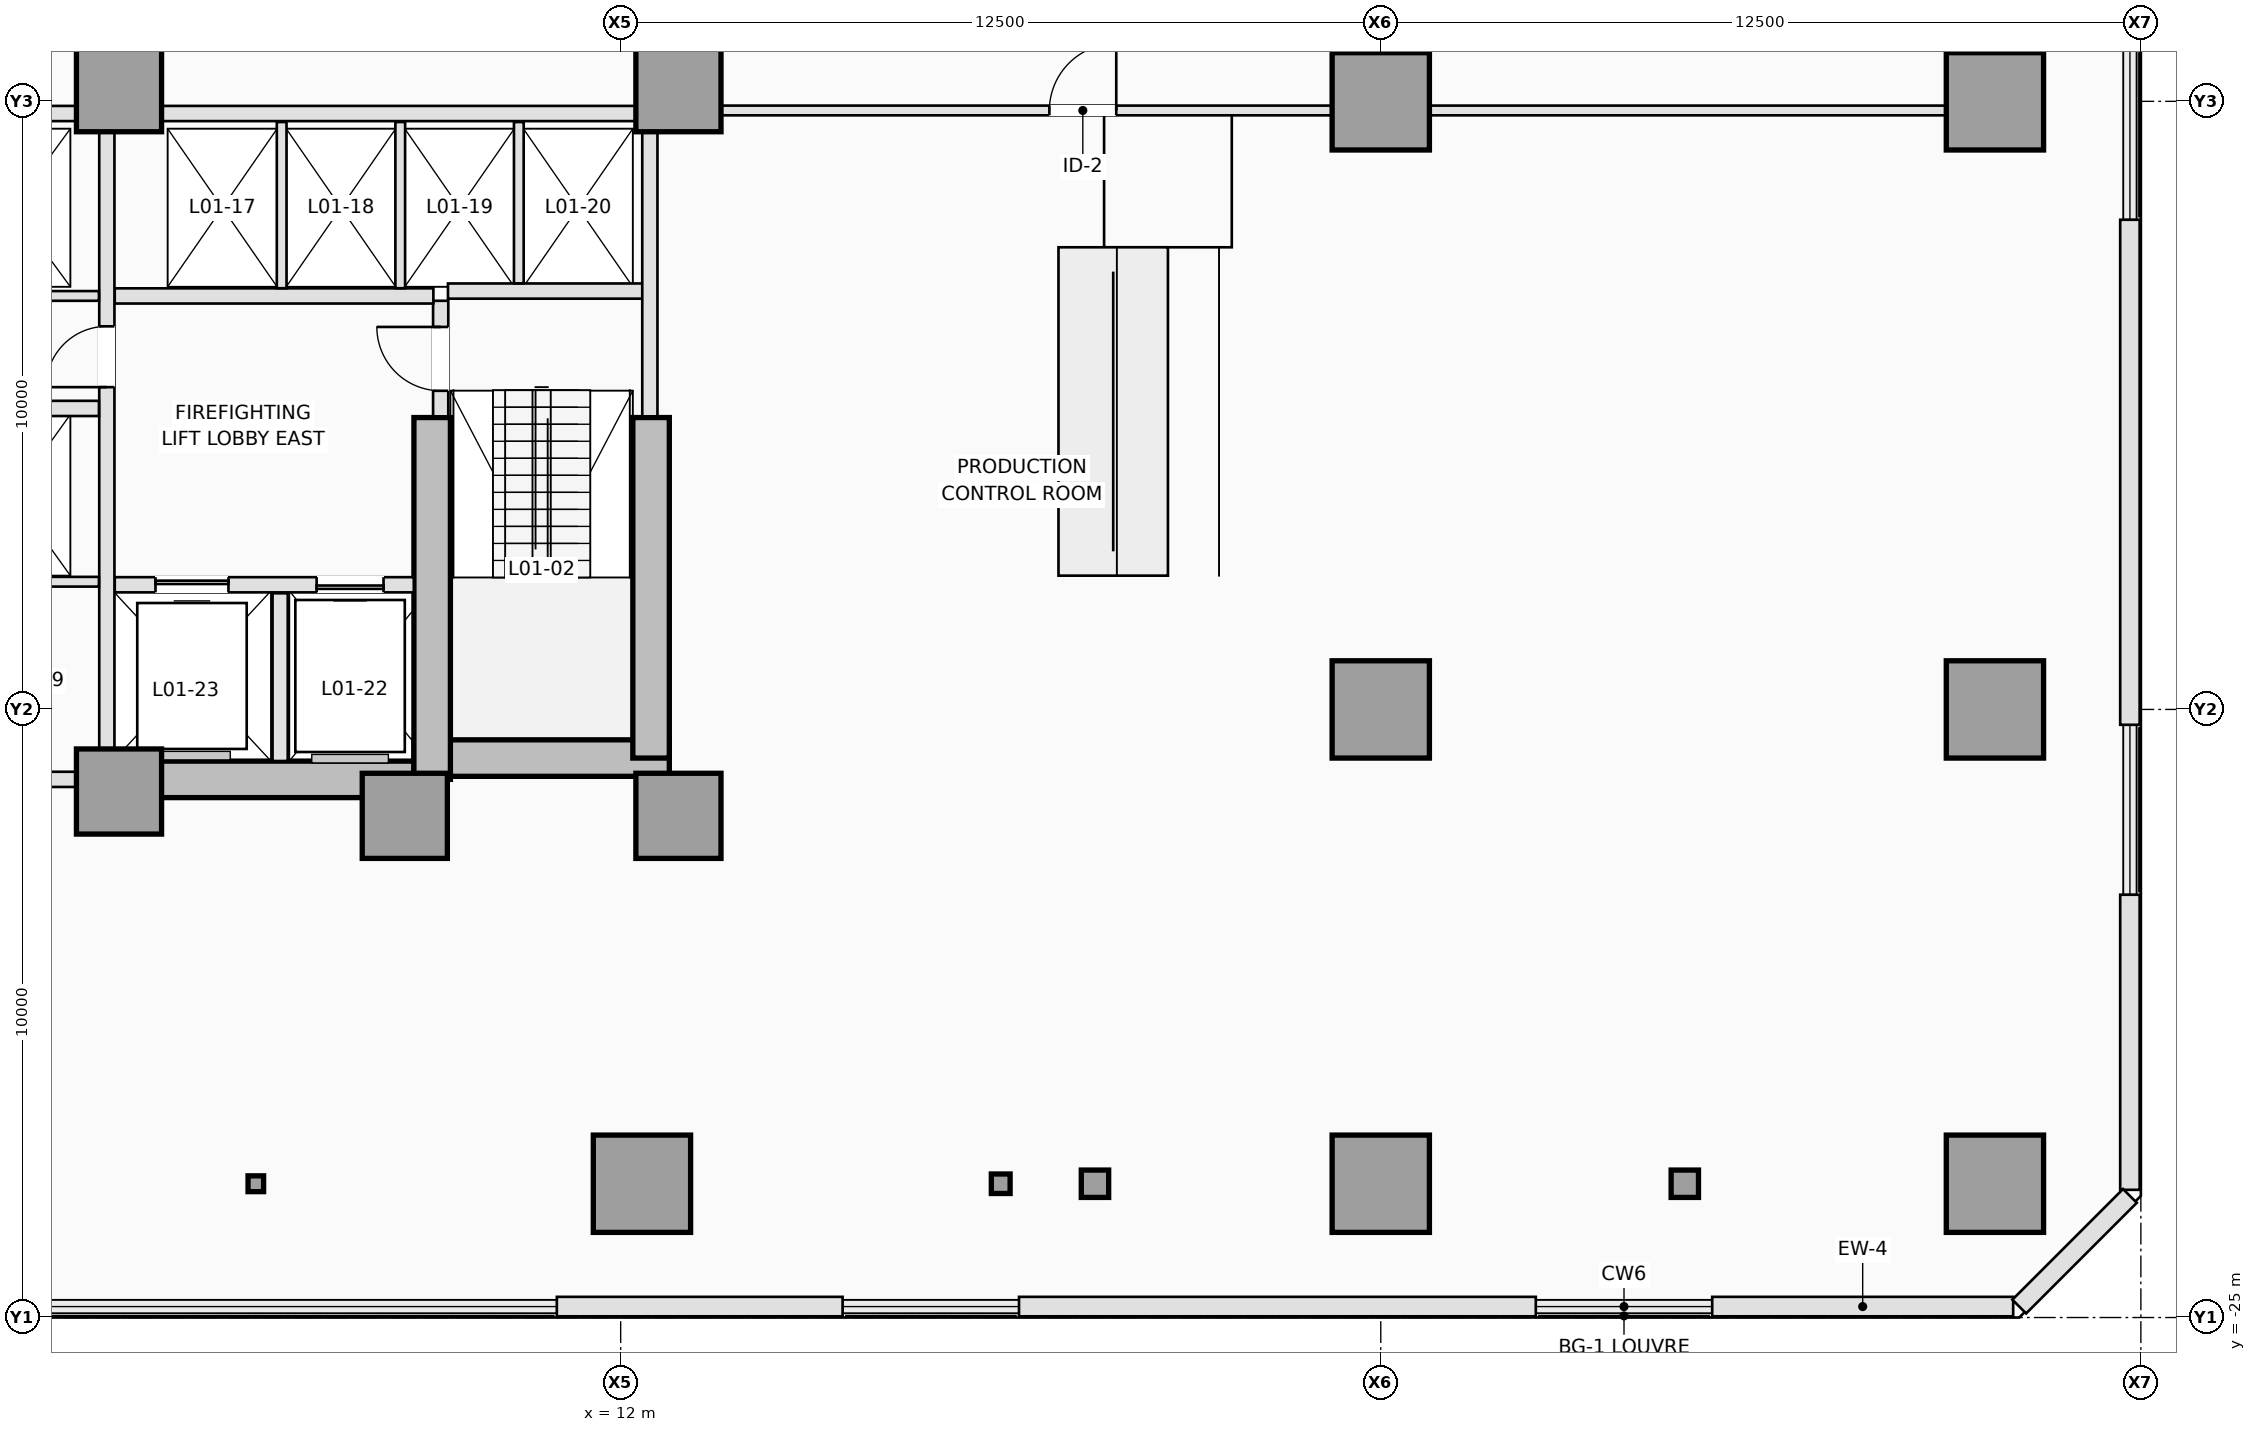
"""IFC4 building model, lengths in metres.
Left out: names, types, materials, properties, quantities, classifications, styles, units other than length and angle.
Written with IfcOpenShell. Run it as: python <this file> out.ifc"""

import sys

from ifc_helpers import new_model, si_unit, direction, frame, frame_2d, origin, origin_2d, place, context, subcontext, project, spatial, rectangle, i_section, extrude, element, fill, save


model = new_model("IFC4")
c1 = context("Model", 3, precision=1e-05, world=origin(), true_north=direction((0.0, 1.0)))
c2 = subcontext(c1, "Body", "Model", "MODEL_VIEW")
j1 = project(units=[si_unit("LENGTHUNIT", "METRE"), si_unit("PLANEANGLEUNIT", "RADIAN")], contexts=[c1])
p1 = place(None, origin())
s1 = spatial("IfcSite", under=j1, at=p1, CompositionType="ELEMENT")
p2 = place(p1, origin())
s2 = spatial("IfcBuilding", under=s1, at=p2, CompositionType="ELEMENT")
p3 = place(p2, frame((0.0, 0.0, 5.0)))
s3 = spatial("IfcBuildingStorey", under=s2, at=p3, CompositionType="ELEMENT", Elevation=5.0)
p4 = place(p3, frame((3.75, -16.15, 0.0), z_axis=(0.0, 0.0, 1.0), x_axis=(1.0, 0.0, 0.0)))
e1 = element("IfcWall", 1, at=p4, inside=s3, PredefinedType="SHEAR", context=c2, shape_type="SweptSolid", body=[
    extrude(rectangle(XDim=5.15, YDim=0.6, at=frame_2d((2.575, 0.0))), origin(), (0.0, 0.0, 1.0), 4.5),
])
p5 = place(p3, frame((8.6, -15.8, 0.0), z_axis=(0.0, 0.0, 1.0), x_axis=(1.0, 0.0, 0.0)))
e2 = element("IfcWall", 2, at=p5, inside=s3, PredefinedType="SHEAR", context=c2, shape_type="SweptSolid", body=[
    extrude(rectangle(XDim=4.2, YDim=0.6, at=frame_2d((2.1, 0.0))), origin(), (0.0, 0.0, 1.0), 4.5),
])
p6 = place(p3, frame((12.5, -15.8, 0.0), z_axis=(0.0, 0.0, 1.0), x_axis=(0.0, 1.0, 0.0)))
e3 = element("IfcWall", 3, at=p6, inside=s3, PredefinedType="SHEAR", context=c2, shape_type="SweptSolid", body=[
    extrude(rectangle(XDim=5.6, YDim=0.6, at=frame_2d((2.8, 0.0))), origin(), (0.0, 0.0, 1.0), 4.5),
])
p7 = place(p3, frame((8.9, -16.15, 0.0), z_axis=(0.0, 0.0, 1.0), x_axis=(0.0, 1.0, 0.0)))
e4 = element("IfcWall", 4, at=p7, inside=s3, PredefinedType="SHEAR", context=c2, shape_type="SweptSolid", body=[
    extrude(rectangle(XDim=5.95, YDim=0.6, at=frame_2d((2.975, 0.0))), origin(), (0.0, 0.0, 1.0), 4.5),
])
for number, where, z_axis, x_axis in (
    (5, (3.75, -16.35, 0.0), (0.0, 0.0, 1.0), (1.0, 0.0, 0.0)),
    (6, (8.45, -16.75, 0.0), (0.0, 0.0, 1.0), (1.0, 0.0, 0.0)),
    (7, (12.95, -16.75, 0.0), (0.0, 0.0, 1.0), (1.0, 0.0, 0.0)),
    (8, (3.75, -4.8, 0.0), (0.0, 0.0, 1.0), (1.0, 0.0, 0.0)),
    (9, (12.95, -4.8, 0.0), (0.0, 0.0, 1.0), (1.0, 0.0, 0.0)),
):
    element("IfcColumn", number, at=place(p3, frame(where, z_axis=z_axis, x_axis=x_axis)), inside=s3, PredefinedType="COLUMN", context=c2, shape_type="SweptSolid", body=[
        extrude(rectangle(XDim=1.4, YDim=1.4, at=origin_2d()), origin(), (0.0, 0.0, 1.0), 4.5),
    ])
for number, where, z_axis, x_axis in (
    (10, (12.35, -22.8, 0.0), (0.0, 0.0, 1.0), (1.0, 0.0, 0.0)),
    (11, (24.5, -22.8, 0.0), (0.0, 0.0, 1.0), (1.0, 0.0, 0.0)),
    (12, (34.6, -22.8, 0.0), (0.0, 0.0, 1.0), (1.0, 0.0, 0.0)),
    (13, (24.5, -15.0, 0.0), (0.0, 0.0, 1.0), (1.0, 0.0, 0.0)),
    (14, (34.6, -15.0, 0.0), (0.0, 0.0, 1.0), (1.0, 0.0, 0.0)),
    (15, (24.5, -5.0, 0.0), (0.0, 0.0, 1.0), (1.0, 0.0, 0.0)),
    (16, (34.6, -5.0, 0.0), (0.0, 0.0, 1.0), (1.0, 0.0, 0.0)),
):
    element("IfcColumn", number, at=place(p3, frame(where, z_axis=z_axis, x_axis=x_axis)), inside=s3, PredefinedType="COLUMN", context=c2, shape_type="SweptSolid", body=[
        extrude(rectangle(XDim=1.6, YDim=1.6, at=origin_2d()), origin(), (0.0, 0.0, 1.0), 4.5),
    ])
p8 = place(p3, frame((18.25, -22.8, 0.0), z_axis=(0.0, 0.0, 1.0), x_axis=(1.0, 0.0, 0.0)))
e17 = element("IfcColumn", 17, at=p8, inside=s3, PredefinedType="COLUMN", context=c2, shape_type="SweptSolid", body=[
    extrude(i_section(OverallWidth=0.309, OverallDepth=0.321, WebThickness=0.014, FlangeThickness=0.022, FilletRadius=0.017, at=origin_2d()), origin(), (0.0, 0.0, 1.0), 4.5),
])
p9 = place(p3, frame((6.0, -22.8, 0.0), z_axis=(0.0, 0.0, 1.0), x_axis=(1.0, 0.0, 0.0)))
e18 = element("IfcColumn", 18, at=p9, inside=s3, PredefinedType="COLUMN", context=c2, shape_type="SweptSolid", body=[
    extrude(i_section(OverallWidth=0.256, OverallDepth=0.26, WebThickness=0.01, FlangeThickness=0.017, FilletRadius=0.014, at=origin_2d()), origin(), (0.0, 0.0, 1.0), 4.5),
])
for number, where, z_axis, x_axis in (
    (19, (19.8, -22.8, 0.0), (0.0, 0.0, 1.0), (1.0, 0.0, 0.0)),
    (20, (29.5, -22.8, 0.0), (0.0, 0.0, 1.0), (1.0, 0.0, 0.0)),
):
    element("IfcColumn", number, at=place(p3, frame(where, z_axis=z_axis, x_axis=x_axis)), inside=s3, PredefinedType="PILASTER", context=c2, shape_type="SweptSolid", body=[
        extrude(rectangle(XDim=0.45, YDim=0.45, at=origin_2d()), origin(), (0.0, 0.0, 1.0), 4.5),
    ])
p10 = place(p3, frame((34.9, -24.82, 0.0), z_axis=(0.0, 0.0, 1.0), x_axis=(-1.0, 0.0, 0.0)))
e21 = element("IfcWall", 21, at=p10, inside=s3, PredefinedType="STANDARD", context=c2, shape_type="SweptSolid", body=[
    extrude(rectangle(XDim=4.949, YDim=0.32, at=frame_2d((2.475, 0.0))), origin(), (0.0, 0.0, 1.0), 4.2),
])
p11 = place(p3, frame((27.05, -24.82, 0.0), z_axis=(0.0, 0.0, 1.0), x_axis=(-1.0, 0.0, 0.0)))
e22 = element("IfcWall", 22, at=p11, inside=s3, PredefinedType="STANDARD", context=c2, shape_type="SweptSolid", body=[
    extrude(rectangle(XDim=8.499, YDim=0.32, at=frame_2d((4.25, 0.0))), origin(), (0.0, 0.0, 1.0), 4.2),
])
p12 = place(p3, frame((15.649, -24.82, 0.0), z_axis=(0.0, 0.0, 1.0), x_axis=(-1.0, 0.0, 0.0)))
e23 = element("IfcWall", 23, at=p12, inside=s3, PredefinedType="STANDARD", context=c2, shape_type="SweptSolid", body=[
    extrude(rectangle(XDim=4.699, YDim=0.32, at=frame_2d((2.35, 0.0))), origin(), (0.0, 0.0, 1.0), 4.2),
])
p13 = place(p3, frame((36.82, -6.947, 0.0), z_axis=(0.0, 0.0, 1.0), x_axis=(0.0, -1.0, 0.0)))
e24 = element("IfcWall", 24, at=p13, inside=s3, PredefinedType="STANDARD", context=c2, shape_type="SweptSolid", body=[
    extrude(rectangle(XDim=8.305, YDim=0.32, at=frame_2d((4.153, 0.0))), origin(), (0.0, 0.0, 1.0), 4.2),
])
p14 = place(p3, frame((36.82, -18.047, 0.0), z_axis=(0.0, 0.0, 1.0), x_axis=(0.0, -1.0, 0.0)))
e25 = element("IfcWall", 25, at=p14, inside=s3, PredefinedType="STANDARD", context=c2, shape_type="SweptSolid", body=[
    extrude(rectangle(XDim=4.853, YDim=0.32, at=frame_2d((2.426, 0.0))), origin(), (0.0, 0.0, 1.0), 4.2),
])
p15 = place(p3, frame((36.82, -23.0, 0.0), z_axis=(0.0, 0.0, 1.0), x_axis=(-0.707106781187, -0.707106781187, 0.0)))
e26 = element("IfcWall", 26, at=p15, inside=s3, PredefinedType="STANDARD", context=c2, shape_type="SweptSolid", body=[
    extrude(rectangle(XDim=2.574, YDim=0.32, at=frame_2d((1.287, 0.0))), origin(), (0.0, 0.0, 1.0), 4.2),
])
p16 = place(p3, frame((9.04, -10.18, 0.0), z_axis=(0.0, 0.0, 1.0), x_axis=(0.0, 1.0, 0.0)))
e27 = element("IfcWall", 27, at=p16, inside=s3, PredefinedType="PARTITIONING", context=c2, shape_type="SweptSolid", body=[
    extrude(rectangle(XDim=1.9, YDim=0.25, at=frame_2d((0.95, 0.0))), origin(), (0.0, 0.0, 1.0), 4.2),
])
p17 = place(p16, frame((0.42, 0.0, 0.0)))
e28 = element("IfcOpeningElement", 28, at=p17, cuts=e27, PredefinedType="OPENING", context=c2, shape_type="SweptSolid", body=[
    extrude(rectangle(XDim=1.05, YDim=2.15, at=frame_2d((0.525, 1.075))), frame((0.0, 0.135, 0.0), z_axis=(0.0, -1.0, 0.0), x_axis=(1.0, 0.0, 0.0)), (0.0, 0.0, 1.0), 0.27),
])
p18 = place(p3, frame((9.16, -8.12, 0.0), z_axis=(0.0, 0.0, 1.0), x_axis=(1.0, 0.0, 0.0)))
e29 = element("IfcWall", 29, at=p18, inside=s3, PredefinedType="PARTITIONING", context=c2, shape_type="SweptSolid", body=[
    extrude(rectangle(XDim=3.22, YDim=0.25, at=frame_2d((1.61, 0.0))), origin(), (0.0, 0.0, 1.0), 4.2),
])
p19 = place(p3, frame((12.48, -10.18, 0.0), z_axis=(0.0, 0.0, 1.0), x_axis=(0.0, 1.0, 0.0)))
e30 = element("IfcWall", 30, at=p19, inside=s3, PredefinedType="PARTITIONING", context=c2, shape_type="SweptSolid", body=[
    extrude(rectangle(XDim=4.678, YDim=0.25, at=frame_2d((2.339, 0.0))), origin(), (0.0, 0.0, 1.0), 4.2),
])
p20 = place(p3, frame((3.68, -12.95, 0.0), z_axis=(0.0, 0.0, 1.0), x_axis=(1.0, 0.0, 0.0)))
e31 = element("IfcWall", 31, at=p20, inside=s3, PredefinedType="PARTITIONING", context=c2, shape_type="SweptSolid", body=[
    extrude(rectangle(XDim=4.918, YDim=0.25, at=frame_2d((2.459, 0.0))), origin(), (0.0, 0.0, 1.0), 4.2),
])
p21 = place(p20, frame((3.32, 0.0, 0.0)))
e32 = element("IfcOpeningElement", 32, at=p21, cuts=e31, PredefinedType="OPENING", context=c2, shape_type="SweptSolid", body=[
    extrude(rectangle(XDim=1.1, YDim=2.15, at=frame_2d((0.55, 1.075))), frame((0.0, 0.135, 0.0), z_axis=(0.0, -1.0, 0.0), x_axis=(1.0, 0.0, 0.0)), (0.0, 0.0, 1.0), 0.27),
])
p22 = place(p20, frame((0.67, 0.0, 0.0)))
e33 = element("IfcOpeningElement", 33, at=p22, cuts=e31, PredefinedType="OPENING", context=c2, shape_type="SweptSolid", body=[
    extrude(rectangle(XDim=1.2, YDim=2.15, at=frame_2d((0.6, 1.075))), frame((0.0, 0.135, 0.0), z_axis=(0.0, -1.0, 0.0), x_axis=(1.0, 0.0, 0.0)), (0.0, 0.0, 1.0), 0.27),
])
p23 = place(p3, frame((6.4, -15.848, 0.0), z_axis=(0.0, 0.0, 1.0), x_axis=(0.0, 1.0, 0.0)))
e34 = element("IfcWall", 34, at=p23, inside=s3, PredefinedType="PARTITIONING", context=c2, shape_type="SweptSolid", body=[
    extrude(rectangle(XDim=2.758, YDim=0.25, at=frame_2d((1.379, 0.0))), origin(), (0.0, 0.0, 1.0), 4.2),
])
p24 = place(p3, frame((3.68, -8.2, 0.0), z_axis=(0.0, 0.0, 1.0), x_axis=(1.0, 0.0, 0.0)))
e35 = element("IfcWall", 35, at=p24, inside=s3, PredefinedType="PARTITIONING", context=c2, shape_type="SweptSolid", body=[
    extrude(rectangle(XDim=5.24, YDim=0.25, at=frame_2d((2.62, 0.0))), origin(), (0.0, 0.0, 1.0), 4.2),
])
p25 = place(p3, frame((3.55, -15.648, 0.0), z_axis=(0.0, 0.0, 1.0), x_axis=(0.0, 1.0, 0.0)))
e36 = element("IfcWall", 36, at=p25, inside=s3, PredefinedType="PARTITIONING", context=c2, shape_type="SweptSolid", body=[
    extrude(rectangle(XDim=10.146, YDim=0.25, at=frame_2d((5.073, 0.0))), origin(), (0.0, 0.0, 1.0), 4.2),
])
p26 = place(p25, frame((5.948, 0.0, 0.0)))
e37 = element("IfcOpeningElement", 37, at=p26, cuts=e36, PredefinedType="OPENING", context=c2, shape_type="SweptSolid", body=[
    extrude(rectangle(XDim=1.0, YDim=2.15, at=frame_2d((0.5, 1.075))), frame((0.0, 0.135, 0.0), z_axis=(0.0, -1.0, 0.0), x_axis=(1.0, 0.0, 0.0)), (0.0, 0.0, 1.0), 0.27),
])
p27 = place(p3, frame((4.452, -5.2, 0.0), z_axis=(0.0, 0.0, 1.0), x_axis=(1.0, 0.0, 0.0)))
e38 = element("IfcWall", 38, at=p27, inside=s3, PredefinedType="PARTITIONING", context=c2, shape_type="SweptSolid", body=[
    extrude(rectangle(XDim=7.796, YDim=0.25, at=frame_2d((3.898, 0.0))), origin(), (0.0, 0.0, 1.0), 4.2),
])
p28 = place(p3, frame((0.95, -5.2, 0.0), z_axis=(0.0, 0.0, 1.0), x_axis=(1.0, 0.0, 0.0)))
e39 = element("IfcWall", 39, at=p28, inside=s3, PredefinedType="PARTITIONING", context=c2, shape_type="SweptSolid", body=[
    extrude(rectangle(XDim=2.098, YDim=0.25, at=frame_2d((1.049, 0.0))), origin(), (0.0, 0.0, 1.0), 4.2),
])
for number, where, z_axis, x_axis in (
    (40, (6.425, -8.073, 0.0), (0.0, 0.0, 1.0), (0.0, 1.0, 0.0)),
    (41, (8.375, -8.073, 0.0), (0.0, 0.0, 1.0), (0.0, 1.0, 0.0)),
):
    element("IfcWall", number, at=place(p3, frame(where, z_axis=z_axis, x_axis=x_axis)), inside=s3, PredefinedType="PARTITIONING", context=c2, shape_type="SweptSolid", body=[
        extrude(rectangle(XDim=2.733, YDim=0.16, at=frame_2d((1.366, 0.0))), origin(), (0.0, 0.0, 1.0), 4.2),
    ])
p29 = place(p3, frame((10.325, -7.993, 0.0), z_axis=(0.0, 0.0, 1.0), x_axis=(0.0, 1.0, 0.0)))
e42 = element("IfcWall", 42, at=p29, inside=s3, PredefinedType="PARTITIONING", context=c2, shape_type="SweptSolid", body=[
    extrude(rectangle(XDim=2.653, YDim=0.16, at=frame_2d((1.326, 0.0))), origin(), (0.0, 0.0, 1.0), 4.2),
])
p30 = place(p3, frame((-3.048, -16.15, 0.0), z_axis=(0.0, 0.0, 1.0), x_axis=(1.0, 0.0, 0.0)))
e43 = element("IfcWall", 43, at=p30, inside=s3, PredefinedType="PARTITIONING", context=c2, shape_type="SweptSolid", body=[
    extrude(rectangle(XDim=6.096, YDim=0.25, at=frame_2d((3.048, 0.0))), origin(), (0.0, 0.0, 1.0), 3.176),
])
p31 = place(p3, frame((0.95, -8.2, 0.0), z_axis=(0.0, 0.0, 1.0), x_axis=(1.0, 0.0, 0.0)))
e44 = element("IfcWall", 44, at=p31, inside=s3, PredefinedType="PARTITIONING", context=c2, shape_type="SweptSolid", body=[
    extrude(rectangle(XDim=2.47, YDim=0.16, at=frame_2d((1.235, 0.0))), origin(), (0.0, 0.0, 1.0), 4.2),
])
p32 = place(p3, frame((0.95, -10.05, 0.0), z_axis=(0.0, 0.0, 1.0), x_axis=(1.0, 0.0, 0.0)))
e45 = element("IfcWall", 45, at=p32, inside=s3, PredefinedType="PARTITIONING", context=c2, shape_type="SweptSolid", body=[
    extrude(rectangle(XDim=2.47, YDim=0.25, at=frame_2d((1.235, 0.0))), origin(), (0.0, 0.0, 1.0), 4.2),
])
p33 = place(p3, frame((-3.42, -12.9, 0.0), z_axis=(0.0, 0.0, 1.0), x_axis=(1.0, 0.0, 0.0)))
e46 = element("IfcWall", 46, at=p33, inside=s3, PredefinedType="PARTITIONING", context=c2, shape_type="SweptSolid", body=[
    extrude(rectangle(XDim=6.84, YDim=0.16, at=frame_2d((3.42, 0.0))), origin(), (0.0, 0.0, 1.0), 4.2),
])
p34 = place(p33, frame((2.98, 0.0, 0.0)))
e47 = element("IfcOpeningElement", 47, at=p34, cuts=e46, PredefinedType="OPENING", context=c2, shape_type="SweptSolid", body=[
    extrude(rectangle(XDim=0.88, YDim=2.12, at=frame_2d((0.44, 1.06))), frame((0.0, 0.09, 0.0), z_axis=(0.0, -1.0, 0.0), x_axis=(1.0, 0.0, 0.0)), (0.0, 0.0, 1.0), 0.18),
])
p35 = place(p3, frame((13.652, -5.15, 0.0), z_axis=(0.0, 0.0, 1.0), x_axis=(1.0, 0.0, 0.0)))
e48 = element("IfcWall", 48, at=p35, inside=s3, PredefinedType="PARTITIONING", context=c2, shape_type="SweptSolid", body=[
    extrude(rectangle(XDim=10.046, YDim=0.16, at=frame_2d((5.023, 0.0))), origin(), (0.0, 0.0, 1.0), 3.176),
])
p36 = place(p35, frame((5.398, 0.0, 0.0)))
e49 = element("IfcOpeningElement", 49, at=p36, cuts=e48, PredefinedType="OPENING", context=c2, shape_type="SweptSolid", body=[
    extrude(rectangle(XDim=1.1, YDim=2.15, at=frame_2d((0.55, 1.075))), frame((0.0, 0.09, 0.0), z_axis=(0.0, -1.0, 0.0), x_axis=(1.0, 0.0, 0.0)), (0.0, 0.0, 1.0), 0.18),
])
p37 = place(p3, frame((25.302, -5.15, 0.0), z_axis=(0.0, 0.0, 1.0), x_axis=(1.0, 0.0, 0.0)))
e50 = element("IfcWall", 50, at=p37, inside=s3, PredefinedType="PARTITIONING", context=c2, shape_type="SweptSolid", body=[
    extrude(rectangle(XDim=8.496, YDim=0.16, at=frame_2d((4.248, 0.0))), origin(), (0.0, 0.0, 1.0), 3.176),
])
p38 = place(p21, origin())
e51 = element("IfcDoor", 51, at=p38, inside=s3, OperationType="SLIDING_TO_RIGHT", PredefinedType="DOOR", context=c2, shape_type="SweptSolid", body=[
    extrude(rectangle(XDim=1.1, YDim=2.15, at=frame_2d((0.55, 1.075))), frame((0.0, 0.025, 0.0), z_axis=(0.0, -1.0, 0.0), x_axis=(1.0, 0.0, 0.0)), (0.0, 0.0, 1.0), 0.05),
])
fill(e32, e51)
p39 = place(p22, origin())
e52 = element("IfcDoor", 52, at=p39, inside=s3, OperationType="SLIDING_TO_LEFT", PredefinedType="DOOR", context=c2, shape_type="SweptSolid", body=[
    extrude(rectangle(XDim=1.2, YDim=2.15, at=frame_2d((0.6, 1.075))), frame((0.0, 0.025, 0.0), z_axis=(0.0, -1.0, 0.0), x_axis=(1.0, 0.0, 0.0)), (0.0, 0.0, 1.0), 0.05),
])
fill(e33, e52)
p40 = place(p17, origin())
e53 = element("IfcDoor", 53, at=p40, inside=s3, OperationType="SINGLE_SWING_RIGHT", PredefinedType="DOOR", context=c2, shape_type="SweptSolid", body=[
    extrude(rectangle(XDim=1.05, YDim=2.15, at=frame_2d((0.525, 1.075))), frame((0.0, 0.025, 0.0), z_axis=(0.0, -1.0, 0.0), x_axis=(1.0, 0.0, 0.0)), (0.0, 0.0, 1.0), 0.05),
])
fill(e28, e53)
p41 = place(p26, origin())
e54 = element("IfcDoor", 54, at=p41, inside=s3, OperationType="SINGLE_SWING_LEFT", PredefinedType="DOOR", context=c2, shape_type="SweptSolid", body=[
    extrude(rectangle(XDim=1.0, YDim=2.15, at=frame_2d((0.5, 1.075))), frame((0.0, 0.025, 0.0), z_axis=(0.0, -1.0, 0.0), x_axis=(1.0, 0.0, 0.0)), (0.0, 0.0, 1.0), 0.05),
])
fill(e37, e54)
p42 = place(p36, origin())
e55 = element("IfcDoor", 55, at=p42, inside=s3, OperationType="SINGLE_SWING_RIGHT", PredefinedType="DOOR", context=c2, shape_type="SweptSolid", body=[
    extrude(rectangle(XDim=1.1, YDim=2.15, at=frame_2d((0.55, 1.075))), frame((0.0, 0.025, 0.0), z_axis=(0.0, -1.0, 0.0), x_axis=(1.0, 0.0, 0.0)), (0.0, 0.0, 1.0), 0.05),
])
fill(e49, e55)
save(model, sys.argv[1])
